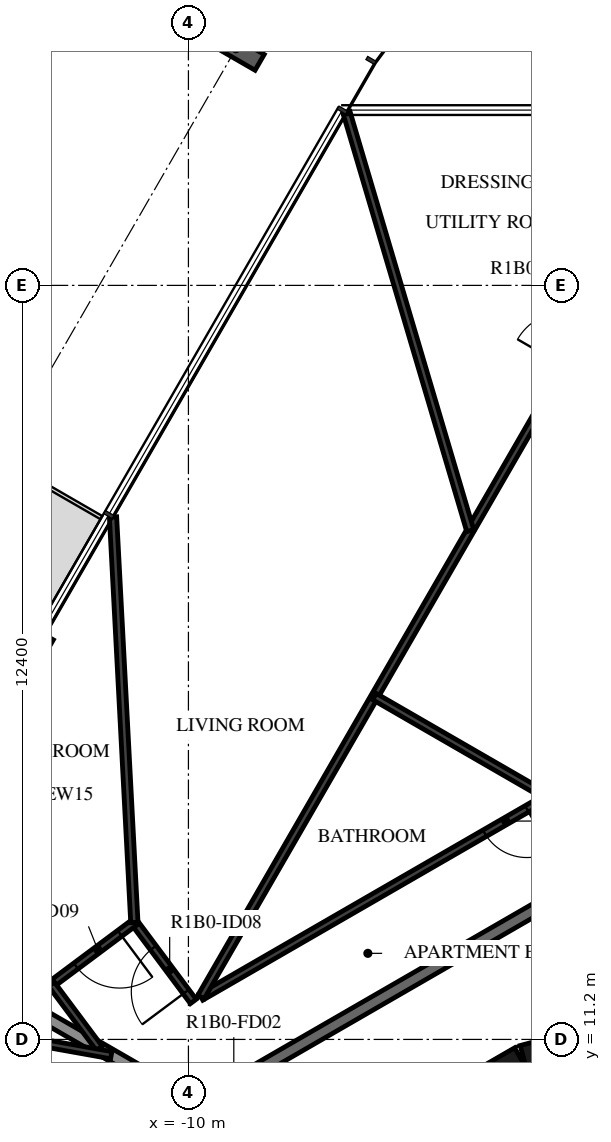
"""IFC4 building model, lengths in metres.
Left out: names, types, materials, properties, quantities, classifications, styles, units other than length and angle.
Written with IfcOpenShell. Run it as: python <this file> out.ifc"""

import sys

from ifc_helpers import new_model, si_unit, direction, frame, frame_2d, origin, origin_2d, place, context, subcontext, project, spatial, rectangle, i_section, extrude, element, fill, save


model = new_model("IFC4")
c1 = context("Model", 3, precision=1e-05, world=origin(), true_north=direction((0.0, 1.0)))
c2 = subcontext(c1, "Body", "Model", "MODEL_VIEW")
j1 = project(units=[si_unit("LENGTHUNIT", "METRE"), si_unit("PLANEANGLEUNIT", "RADIAN")], contexts=[c1])
p1 = place(None, origin())
s1 = spatial("IfcSite", under=j1, at=p1, CompositionType="ELEMENT")
p2 = place(p1, origin())
s2 = spatial("IfcBuilding", under=s1, at=p2, CompositionType="ELEMENT")
p3 = place(p2, frame((0.0, 0.0, 52.4)))
s3 = spatial("IfcBuildingStorey", under=s2, at=p3, CompositionType="ELEMENT", Elevation=52.4)
p4 = place(p3, frame((-9.219, 27.493, -0.38), z_axis=(0.0, 0.0, 1.0), x_axis=(0.50000017485, 0.866025302835, 0.0)))
e1 = element("IfcColumn", 1, at=p4, inside=s3, PredefinedType="COLUMN", context=c2, shape_type="SweptSolid", body=[
    extrude(i_section(OverallWidth=0.3, OverallDepth=0.9, WebThickness=0.019, FlangeThickness=0.035, FilletRadius=0.03, at=origin_2d()), origin(), (0.0, 0.0, 1.0), 3.5),
])
p5 = place(p3, frame((-12.291, 17.812, 0.0), z_axis=(0.0, 0.0, 1.0), x_axis=(-0.499971222258, -0.866042017984, 0.0)))
e2 = element("IfcWall", 2, at=p5, inside=s3, PredefinedType="STANDARD", context=c2, shape_type="SweptSolid", body=[
    extrude(rectangle(XDim=3.2, YDim=0.16, at=frame_2d((1.6, 0.0))), origin(), (0.0, 0.0, 1.0), 3.12),
])
p6 = place(p5, frame((0.4, 0.0, 0.0)))
e3 = element("IfcOpeningElement", 3, at=p6, cuts=e2, PredefinedType="OPENING", context=c2, shape_type="SweptSolid", body=[
    extrude(rectangle(XDim=2.4, YDim=2.4, at=frame_2d((1.2, 1.2))), frame((0.0, 0.09, 0.0), z_axis=(0.0, -1.0, 0.0), x_axis=(1.0, 0.0, 0.0)), (0.0, 0.0, 1.0), 0.18),
])
for number, where, z_axis, x_axis in (
    (4, (-1.55, 11.643, 0.0), (0.0, 0.0, 1.0), (-0.966, -0.259, 0.0)),
    (5, (-4.51, 10.845, 0.0), (0.0, 0.0, 1.0), (-0.866, -0.5, 0.0)),
):
    element("IfcWall", number, at=place(p3, frame(where, z_axis=z_axis, x_axis=x_axis)), inside=s3, PredefinedType="SHEAR", context=c2, shape_type="SweptSolid", body=[
        extrude(rectangle(XDim=3.033, YDim=0.5, at=frame_2d((1.516, 0.0))), origin(), (0.0, 0.0, 1.0), 3.12),
    ])
p7 = place(p3, frame((-3.671, 13.7, 0.0), z_axis=(0.0, 0.0, 1.0), x_axis=(-0.866031419417, -0.499989580474, 0.0)))
e6 = element("IfcWall", 6, at=p7, inside=s3, PredefinedType="STANDARD", context=c2, shape_type="SweptSolid", body=[
    extrude(rectangle(XDim=7.147, YDim=0.2, at=frame_2d((3.573, 0.0))), origin(), (0.0, 0.0, 1.0), 3.12),
])
p8 = place(p7, frame((5.947, 0.0, 0.0)))
e7 = element("IfcOpeningElement", 7, at=p8, cuts=e6, PredefinedType="OPENING", context=c2, shape_type="SweptSolid", body=[
    extrude(rectangle(XDim=1.0, YDim=2.1, at=frame_2d((0.5, 1.05))), frame((0.0, 0.11, 0.0), z_axis=(0.0, -1.0, 0.0), x_axis=(1.0, 0.0, 0.0)), (0.0, 0.0, 1.0), 0.22),
])
p9 = place(p3, frame((-15.08, 13.14, 0.0), z_axis=(0.0, 0.0, 1.0), x_axis=(0.86603112331, -0.49999009336, 0.0)))
e8 = element("IfcWall", 8, at=p9, inside=s3, PredefinedType="STANDARD", context=c2, shape_type="SweptSolid", body=[
    extrude(rectangle(XDim=6.027, YDim=0.2, at=frame_2d((3.014, 0.0))), origin(), (0.0, 0.0, 1.0), 2.73),
])
p10 = place(p3, frame((-9.92, 11.824, 0.0), z_axis=(0.0, 0.0, 1.0), x_axis=(-0.597853402964, 0.801605456921, 0.0)))
e9 = element("IfcWall", 9, at=p10, inside=s3, PredefinedType="PARTITIONING", context=c2, shape_type="SweptSolid", body=[
    extrude(rectangle(XDim=1.621, YDim=0.12, at=frame_2d((0.811, 0.0))), origin(), (0.0, 0.0, 1.0), 3.12),
])
p11 = place(p10, frame((0.2, 0.0, 0.0)))
e10 = element("IfcOpeningElement", 10, at=p11, cuts=e9, PredefinedType="OPENING", context=c2, shape_type="SweptSolid", body=[
    extrude(rectangle(XDim=0.9, YDim=2.1, at=frame_2d((0.45, 1.05))), frame((0.0, 0.07, 0.0), z_axis=(0.0, -1.0, 0.0), x_axis=(1.0, 0.0, 0.0)), (0.0, 0.0, 1.0), 0.14),
])
p12 = place(p3, frame((-4.088, 15.191, 0.0), z_axis=(0.0, 0.0, 1.0), x_axis=(-0.866024500911, -0.50000156382, 0.0)))
e11 = element("IfcWall", 11, at=p12, inside=s3, PredefinedType="PARTITIONING", context=c2, shape_type="SweptSolid", body=[
    extrude(rectangle(XDim=6.587, YDim=0.12, at=frame_2d((3.294, 0.0))), origin(), (0.0, 0.0, 1.0), 3.12),
])
p13 = place(p12, frame((0.4, 0.0, 0.0)))
e12 = element("IfcOpeningElement", 12, at=p13, cuts=e11, PredefinedType="OPENING", context=c2, shape_type="SweptSolid", body=[
    extrude(rectangle(XDim=0.8, YDim=2.1, at=frame_2d((0.4, 1.05))), frame((0.0, 0.07, 0.0), z_axis=(0.0, -1.0, 0.0), x_axis=(1.0, 0.0, 0.0)), (0.0, 0.0, 1.0), 0.14),
])
p14 = place(p3, frame((-10.889, 13.124, 0.0), z_axis=(0.0, 0.0, 1.0), x_axis=(-0.801616976804, -0.597837956724, 0.0)))
e13 = element("IfcWall", 13, at=p14, inside=s3, PredefinedType="PARTITIONING", context=c2, shape_type="SweptSolid", body=[
    extrude(rectangle(XDim=1.7, YDim=0.12, at=frame_2d((0.85, 0.0))), origin(), (0.0, 0.0, 1.0), 3.12),
])
p15 = place(p14, frame((0.3, 0.0, 0.0)))
e14 = element("IfcOpeningElement", 14, at=p15, cuts=e13, PredefinedType="OPENING", context=c2, shape_type="SweptSolid", body=[
    extrude(rectangle(XDim=0.9, YDim=2.1, at=frame_2d((0.45, 1.05))), frame((0.0, 0.07, 0.0), z_axis=(0.0, -1.0, 0.0), x_axis=(1.0, 0.0, 0.0)), (0.0, 0.0, 1.0), 0.14),
])
p16 = place(p3, frame((-12.252, 12.107, 0.0), z_axis=(0.0, 0.0, 1.0), x_axis=(0.597827926538, -0.801624457119, 0.0)))
e15 = element("IfcWall", 15, at=p16, inside=s3, PredefinedType="PARTITIONING", context=c2, shape_type="SweptSolid", body=[
    extrude(rectangle(XDim=1.314, YDim=0.12, at=frame_2d((0.657, 0.0))), origin(), (0.0, 0.0, 1.0), 3.12),
])
p17 = place(p3, frame((-9.793, 11.897, 0.0), z_axis=(0.0, 0.0, 1.0), x_axis=(0.499981117606, 0.866036305265, 0.0)))
e16 = element("IfcWall", 16, at=p17, inside=s3, PredefinedType="PARTITIONING", context=c2, shape_type="SweptSolid", body=[
    extrude(rectangle(XDim=14.434, YDim=0.12, at=frame_2d((7.217, 0.0))), origin(), (0.0, 0.0, 1.0), 3.12),
])
p18 = place(p17, frame((11.97, 0.0, 0.0)))
e17 = element("IfcOpeningElement", 17, at=p18, cuts=e16, PredefinedType="OPENING", context=c2, shape_type="SweptSolid", body=[
    extrude(rectangle(XDim=0.9, YDim=2.1, at=frame_2d((0.45, 1.05))), frame((0.0, 0.07, 0.0), z_axis=(0.0, -1.0, 0.0), x_axis=(1.0, 0.0, 0.0)), (0.0, 0.0, 1.0), 0.14),
])
p19 = place(p3, frame((-6.941, 16.838, 0.0), z_axis=(0.0, 0.0, 1.0), x_axis=(0.866017718408, -0.500013311227, 0.0)))
e18 = element("IfcWall", 18, at=p19, inside=s3, PredefinedType="PARTITIONING", context=c2, shape_type="SweptSolid", body=[
    extrude(rectangle(XDim=3.294, YDim=0.12, at=frame_2d((1.647, 0.0))), origin(), (0.0, 0.0, 1.0), 3.12),
])
p20 = place(p3, frame((-7.4, 26.443, 0.0), z_axis=(0.0, 0.0, 1.0), x_axis=(0.283756762476, -0.958896292489, 0.0)))
e19 = element("IfcWall", 19, at=p20, inside=s3, PredefinedType="PARTITIONING", context=c2, shape_type="SweptSolid", body=[
    extrude(rectangle(XDim=7.17, YDim=0.12, at=frame_2d((3.585, 0.0))), origin(), (0.0, 0.0, 1.0), 3.12),
])
p21 = place(p3, frame((-11.24, 19.792, 0.0), z_axis=(0.0, 0.0, 1.0), x_axis=(0.052579943632, -0.998616718029, 0.0)))
e20 = element("IfcWall", 20, at=p21, inside=s3, PredefinedType="PARTITIONING", context=c2, shape_type="SweptSolid", body=[
    extrude(rectangle(XDim=6.677, YDim=0.12, at=frame_2d((3.338, 0.0))), origin(), (0.0, 0.0, 1.0), 3.12),
])
p22 = place(p3, frame((-11.27, 10.94, 0.0), z_axis=(0.0, 0.0, 1.0), x_axis=(-0.984382718707, 0.176041651637, 0.0)))
e21 = element("IfcWall", 21, at=p22, inside=s3, PredefinedType="PARTITIONING", context=c2, shape_type="SweptSolid", body=[
    extrude(rectangle(XDim=2.222, YDim=0.12, at=frame_2d((1.111, 0.0))), origin(), (0.0, 0.0, 1.0), 3.12),
])
p23 = place(p11, origin())
e22 = element("IfcDoor", 22, at=p23, inside=s3, OperationType="SINGLE_SWING_RIGHT", PredefinedType="DOOR", context=c2, shape_type="SweptSolid", body=[
    extrude(rectangle(XDim=0.9, YDim=2.1, at=frame_2d((0.45, 1.05))), frame((0.0, 0.025, 0.0), z_axis=(0.0, -1.0, 0.0), x_axis=(1.0, 0.0, 0.0)), (0.0, 0.0, 1.0), 0.05),
])
fill(e10, e22)
p24 = place(p13, origin())
e23 = element("IfcDoor", 23, at=p24, inside=s3, OperationType="SINGLE_SWING_LEFT", PredefinedType="DOOR", context=c2, shape_type="SweptSolid", body=[
    extrude(rectangle(XDim=0.8, YDim=2.1, at=frame_2d((0.4, 1.05))), frame((0.0, 0.025, 0.0), z_axis=(0.0, -1.0, 0.0), x_axis=(1.0, 0.0, 0.0)), (0.0, 0.0, 1.0), 0.05),
])
fill(e12, e23)
p25 = place(p15, origin())
e24 = element("IfcDoor", 24, at=p25, inside=s3, OperationType="SINGLE_SWING_LEFT", PredefinedType="DOOR", context=c2, shape_type="SweptSolid", body=[
    extrude(rectangle(XDim=0.9, YDim=2.1, at=frame_2d((0.45, 1.05))), frame((0.0, 0.025, 0.0), z_axis=(0.0, -1.0, 0.0), x_axis=(1.0, 0.0, 0.0)), (0.0, 0.0, 1.0), 0.05),
])
fill(e14, e24)
save(model, sys.argv[1])
